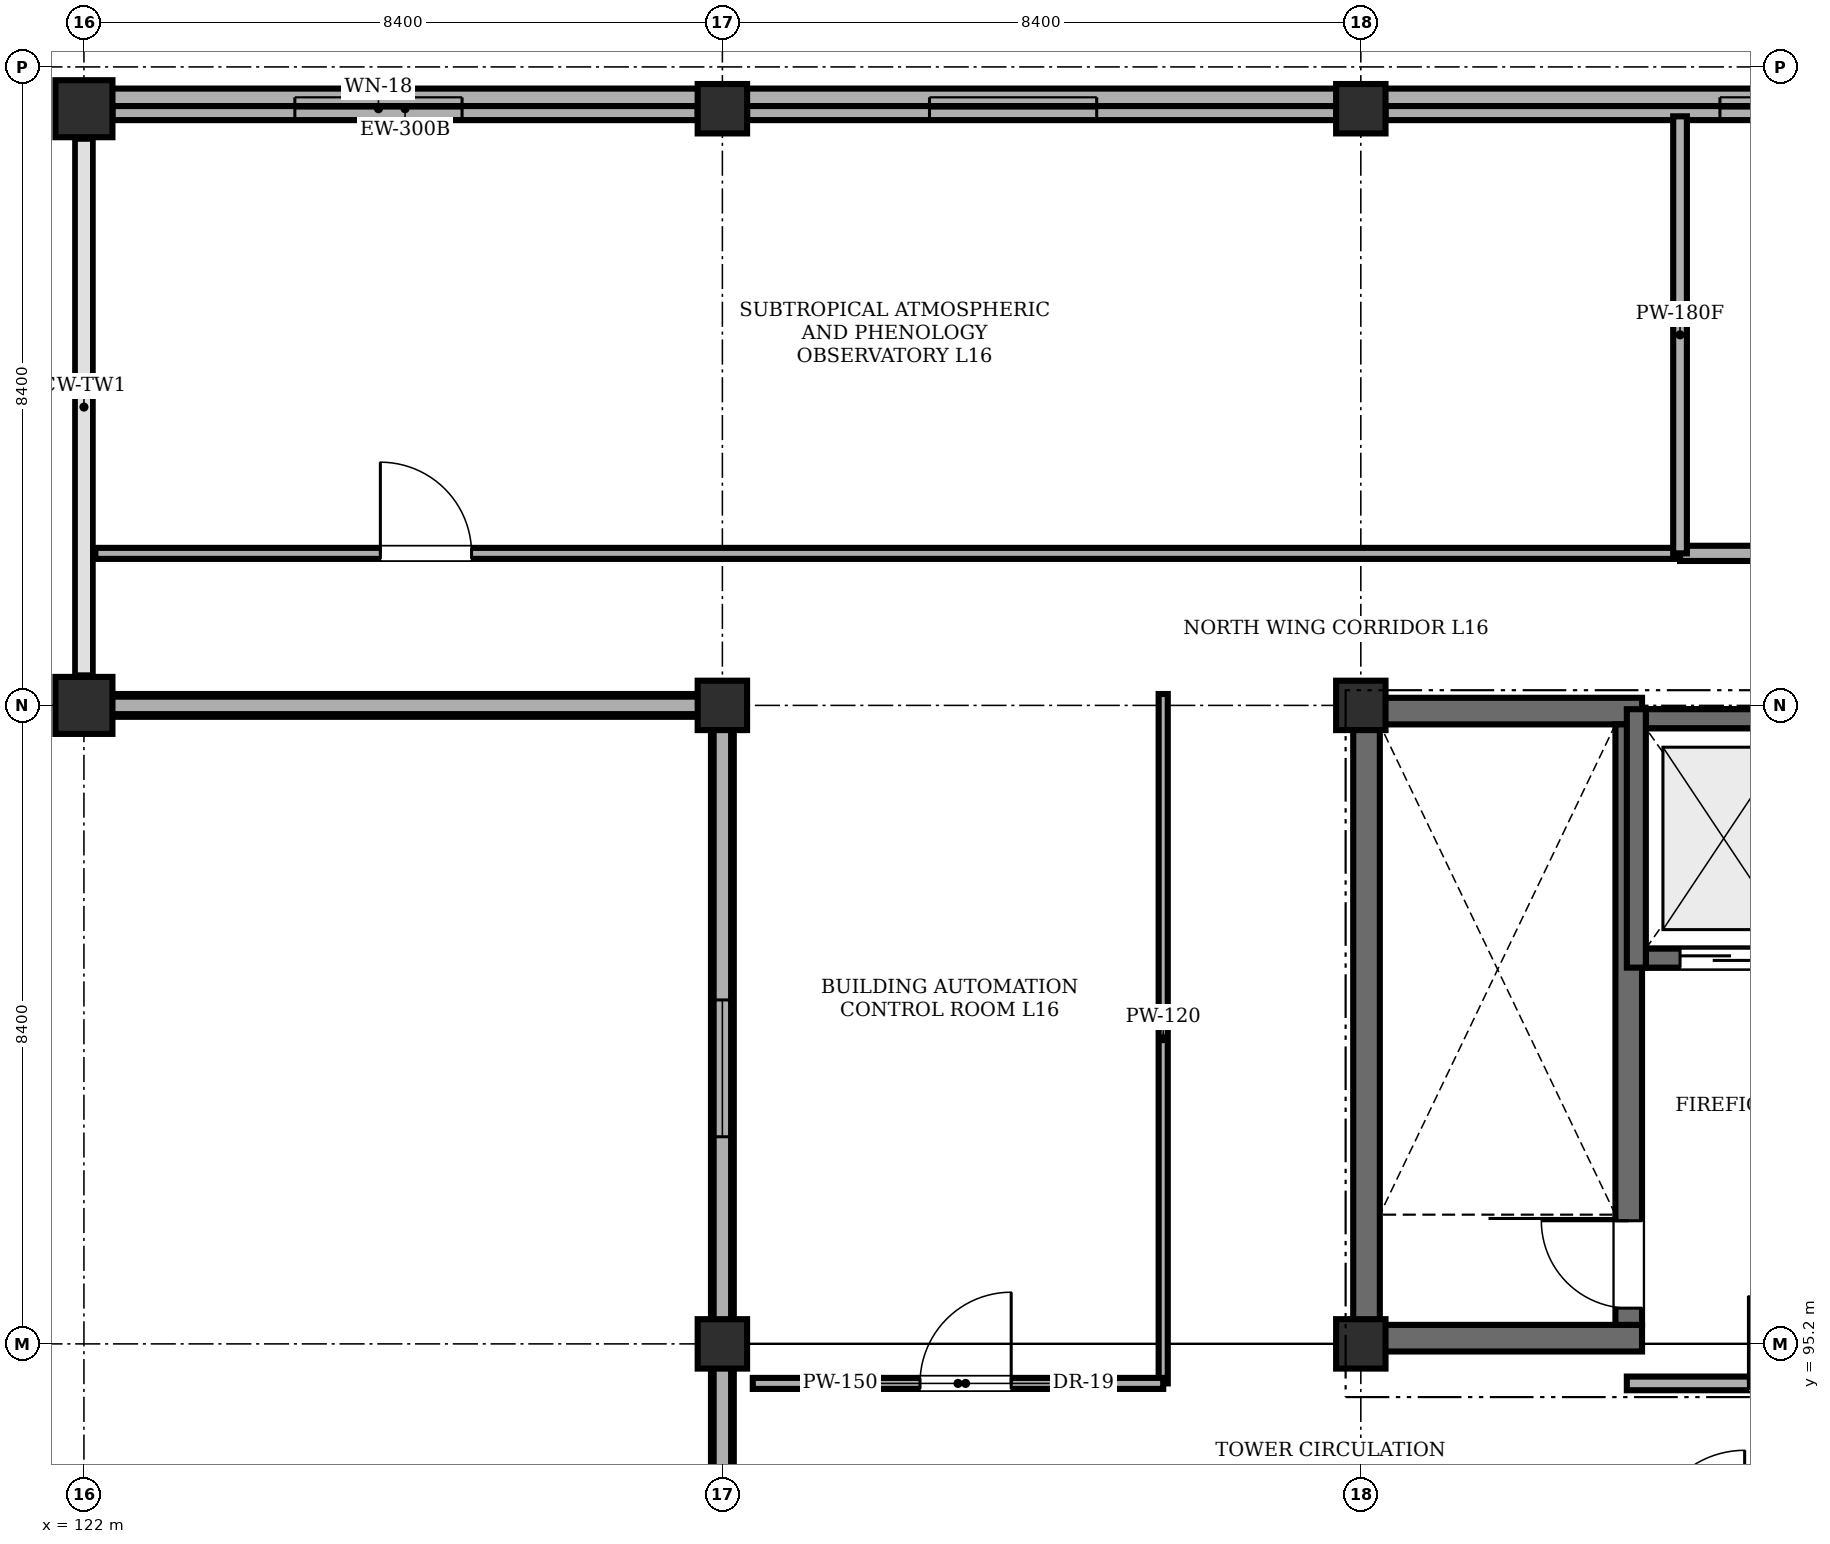
"""IFC4 building model, lengths in metres.
Left out: names, types, materials, properties, quantities, classifications, styles, units other than length and angle.
Written with IfcOpenShell. Run it as: python <this file> out.ifc"""

import sys

from ifc_helpers import new_model, si_unit, direction, frame, frame_2d, origin, origin_2d, place, context, subcontext, project, spatial, rectangle, extrude, element, fill, save


model = new_model("IFC4")
c1 = context("Model", 3, precision=1e-05, world=origin(), true_north=direction((0.0, 1.0)))
c2 = subcontext(c1, "Body", "Model", "MODEL_VIEW")
j1 = project(units=[si_unit("LENGTHUNIT", "METRE"), si_unit("PLANEANGLEUNIT", "RADIAN")], contexts=[c1])
p1 = place(None, origin())
s1 = spatial("IfcSite", under=j1, at=p1, CompositionType="ELEMENT")
p2 = place(p1, origin())
s2 = spatial("IfcBuilding", under=s1, at=p2, CompositionType="ELEMENT")
p3 = place(p2, frame((0.0, 0.0, 65.7)))
s3 = spatial("IfcBuildingStorey", under=s2, at=p3, CompositionType="ELEMENT", Elevation=65.7)
for number, where, z_axis, x_axis in (
    (1, (122.0, 103.6, 0.0), (0.0, 0.0, 1.0), (1.0, 0.0, 0.0)),
    (2, (122.0, 111.45, 0.0), (0.0, 0.0, 1.0), (1.0, 0.0, 0.0)),
):
    element("IfcColumn", number, at=place(p3, frame(where, z_axis=z_axis, x_axis=x_axis)), inside=s3, PredefinedType="COLUMN", context=c2, shape_type="SweptSolid", body=[
        extrude(rectangle(XDim=0.75, YDim=0.75, at=origin_2d()), origin(), (0.0, 0.0, 1.0), 4.3),
    ])
for number, where, z_axis, x_axis in (
    (3, (130.4, 95.2, 0.0), (0.0, 0.0, 1.0), (1.0, 0.0, 0.0)),
    (4, (130.4, 103.6, 0.0), (0.0, 0.0, 1.0), (1.0, 0.0, 0.0)),
    (5, (130.4, 111.45, 0.0), (0.0, 0.0, 1.0), (1.0, 0.0, 0.0)),
    (6, (138.8, 95.2, 0.0), (0.0, 0.0, 1.0), (1.0, 0.0, 0.0)),
    (7, (138.8, 103.6, 0.0), (0.0, 0.0, 1.0), (1.0, 0.0, 0.0)),
    (8, (138.8, 111.45, 0.0), (0.0, 0.0, 1.0), (1.0, 0.0, 0.0)),
):
    element("IfcColumn", number, at=place(p3, frame(where, z_axis=z_axis, x_axis=x_axis)), inside=s3, PredefinedType="COLUMN", context=c2, shape_type="SweptSolid", body=[
        extrude(rectangle(XDim=0.65, YDim=0.65, at=origin_2d()), origin(), (0.0, 0.0, 1.0), 4.3),
    ])
for number, where, z_axis, x_axis in (
    (9, (138.7, 95.275, 0.0), (0.0, 0.0, 1.0), (1.0, 0.0, 0.0)),
    (10, (138.7, 103.525, 0.0), (0.0, 0.0, 1.0), (1.0, 0.0, 0.0)),
):
    element("IfcWall", number, at=place(p3, frame(where, z_axis=z_axis, x_axis=x_axis)), inside=s3, PredefinedType="SHEAR", context=c2, shape_type="SweptSolid", body=[
        extrude(rectangle(XDim=3.8, YDim=0.35, at=frame_2d((1.9, 0.0))), origin(), (0.0, 0.0, 1.0), 4.3),
    ])
p4 = place(p3, frame((138.875, 95.45, 0.0), z_axis=(0.0, 0.0, 1.0), x_axis=(0.0, 1.0, 0.0)))
e11 = element("IfcWall", 11, at=p4, inside=s3, PredefinedType="SHEAR", context=c2, shape_type="SweptSolid", body=[
    extrude(rectangle(XDim=7.9, YDim=0.35, at=frame_2d((3.95, 0.0))), origin(), (0.0, 0.0, 1.0), 4.3),
])
p5 = place(p3, frame((142.325, 95.45, 0.0), z_axis=(0.0, 0.0, 1.0), x_axis=(0.0, 1.0, 0.0)))
e12 = element("IfcWall", 12, at=p5, inside=s3, PredefinedType="SHEAR", context=c2, shape_type="SweptSolid", body=[
    extrude(rectangle(XDim=7.9, YDim=0.35, at=frame_2d((3.95, 0.0))), origin(), (0.0, 0.0, 1.0), 4.3),
])
p6 = place(p5, frame((0.22, 0.0, 0.0)))
e13 = element("IfcOpeningElement", 13, at=p6, cuts=e12, PredefinedType="OPENING", context=c2, shape_type="SweptSolid", body=[
    extrude(rectangle(XDim=1.15, YDim=2.15, at=frame_2d((0.575, 1.075))), frame((0.0, 0.185, 0.0), z_axis=(0.0, -1.0, 0.0), x_axis=(1.0, 0.0, 0.0)), (0.0, 0.0, 1.0), 0.37),
])
p7 = place(p3, frame((142.5, 100.275, 0.0), z_axis=(0.0, 0.0, 1.0), x_axis=(1.0, 0.0, 0.0)))
e14 = element("IfcWall", 14, at=p7, inside=s3, PredefinedType="SHEAR", context=c2, shape_type="SweptSolid", body=[
    extrude(rectangle(XDim=2.1, YDim=0.25, at=frame_2d((1.05, 0.0))), origin(), (0.0, 0.0, 1.0), 4.3),
])
p8 = place(p7, frame((0.5, 0.0, 0.0)))
e15 = element("IfcOpeningElement", 15, at=p8, cuts=e14, PredefinedType="OPENING", context=c2, shape_type="SweptSolid", body=[
    extrude(rectangle(XDim=1.1, YDim=2.15, at=frame_2d((0.55, 1.075))), frame((0.0, 0.135, 0.0), z_axis=(0.0, -1.0, 0.0), x_axis=(1.0, 0.0, 0.0)), (0.0, 0.0, 1.0), 0.27),
])
p9 = place(p3, frame((142.5, 103.425, 0.0), z_axis=(0.0, 0.0, 1.0), x_axis=(1.0, 0.0, 0.0)))
e16 = element("IfcWall", 16, at=p9, inside=s3, PredefinedType="SHEAR", context=c2, shape_type="SweptSolid", body=[
    extrude(rectangle(XDim=2.1, YDim=0.25, at=frame_2d((1.05, 0.0))), origin(), (0.0, 0.0, 1.0), 4.3),
])
for number, where, z_axis, x_axis in (
    (17, (142.55, 100.275, 4.5), (0.0, 0.0, 1.0), (1.0, 0.0, 0.0)),
    (18, (142.55, 103.425, 4.5), (0.0, 0.0, 1.0), (1.0, 0.0, 0.0)),
):
    element("IfcWall", number, at=place(p3, frame(where, z_axis=z_axis, x_axis=x_axis)), inside=s3, PredefinedType="SHEAR", context=c2, shape_type="SweptSolid", body=[
        extrude(rectangle(XDim=2.05, YDim=0.25, at=frame_2d((1.025, 0.0))), origin(), (0.0, 0.0, 1.0), 1.55),
    ])
p10 = place(p3, frame((142.425, 100.15, 4.5), z_axis=(0.0, 0.0, 1.0), x_axis=(0.0, 1.0, 0.0)))
e19 = element("IfcWall", 19, at=p10, inside=s3, PredefinedType="SHEAR", context=c2, shape_type="SweptSolid", body=[
    extrude(rectangle(XDim=3.4, YDim=0.25, at=frame_2d((1.7, 0.0))), origin(), (0.0, 0.0, 1.0), 1.55),
])
p11 = place(p3, frame((122.375, 111.45, 0.0), z_axis=(0.0, 0.0, 1.0), x_axis=(1.0, 0.0, 0.0)))
e20 = element("IfcWall", 20, at=p11, inside=s3, PredefinedType="STANDARD", context=c2, shape_type="SweptSolid", body=[
    extrude(rectangle(XDim=7.7, YDim=0.3, at=frame_2d((3.85, 0.0))), origin(), (0.0, 0.0, 1.0), 3.7),
])
p12 = place(p11, frame((2.4, 0.0, 1.3)))
e21 = element("IfcOpeningElement", 21, at=p12, cuts=e20, PredefinedType="OPENING", context=c2, shape_type="SweptSolid", body=[
    extrude(rectangle(XDim=2.2, YDim=1.2, at=frame_2d((1.1, 0.6))), frame((0.0, 0.16, 0.0), z_axis=(0.0, -1.0, 0.0), x_axis=(1.0, 0.0, 0.0)), (0.0, 0.0, 1.0), 0.32),
])
p13 = place(p3, frame((130.725, 111.45, 0.0), z_axis=(0.0, 0.0, 1.0), x_axis=(1.0, 0.0, 0.0)))
e22 = element("IfcWall", 22, at=p13, inside=s3, PredefinedType="STANDARD", context=c2, shape_type="SweptSolid", body=[
    extrude(rectangle(XDim=7.75, YDim=0.3, at=frame_2d((3.875, 0.0))), origin(), (0.0, 0.0, 1.0), 3.7),
])
p14 = place(p13, frame((2.4, 0.0, 1.3)))
e23 = element("IfcOpeningElement", 23, at=p14, cuts=e22, PredefinedType="OPENING", context=c2, shape_type="SweptSolid", body=[
    extrude(rectangle(XDim=2.2, YDim=1.2, at=frame_2d((1.1, 0.6))), frame((0.0, 0.16, 0.0), z_axis=(0.0, -1.0, 0.0), x_axis=(1.0, 0.0, 0.0)), (0.0, 0.0, 1.0), 0.32),
])
p15 = place(p3, frame((139.125, 111.45, 0.0), z_axis=(0.0, 0.0, 1.0), x_axis=(1.0, 0.0, 0.0)))
e24 = element("IfcWall", 24, at=p15, inside=s3, PredefinedType="STANDARD", context=c2, shape_type="SweptSolid", body=[
    extrude(rectangle(XDim=7.75, YDim=0.3, at=frame_2d((3.875, 0.0))), origin(), (0.0, 0.0, 1.0), 3.7),
])
p16 = place(p15, frame((4.4, 0.0, 1.3)))
e25 = element("IfcOpeningElement", 25, at=p16, cuts=e24, PredefinedType="OPENING", context=c2, shape_type="SweptSolid", body=[
    extrude(rectangle(XDim=2.2, YDim=1.2, at=frame_2d((1.1, 0.6))), frame((0.0, 0.16, 0.0), z_axis=(0.0, -1.0, 0.0), x_axis=(1.0, 0.0, 0.0)), (0.0, 0.0, 1.0), 0.32),
])
p17 = place(p3, frame((130.4, 92.15, 0.0), z_axis=(0.0, 0.0, 1.0), x_axis=(0.0, 1.0, 0.0)))
e26 = element("IfcWall", 26, at=p17, inside=s3, PredefinedType="STANDARD", context=c2, shape_type="SweptSolid", body=[
    extrude(rectangle(XDim=2.725, YDim=0.3, at=frame_2d((1.363, 0.0))), origin(), (0.0, 0.0, 1.0), 4.3),
])
p18 = place(p3, frame((130.4, 95.525, 0.0), z_axis=(0.0, 0.0, 1.0), x_axis=(0.0, 1.0, 0.0)))
e27 = element("IfcWall", 27, at=p18, inside=s3, PredefinedType="STANDARD", context=c2, shape_type="SweptSolid", body=[
    extrude(rectangle(XDim=7.75, YDim=0.3, at=frame_2d((3.875, 0.0))), origin(), (0.0, 0.0, 1.0), 3.7),
])
p19 = place(p18, frame((2.4, 0.0, 1.0)))
e28 = element("IfcOpeningElement", 28, at=p19, cuts=e27, PredefinedType="OPENING", context=c2, shape_type="SweptSolid", body=[
    extrude(rectangle(XDim=1.8, YDim=1.8, at=frame_2d((0.9, 0.9))), frame((0.0, 0.16, 0.0), z_axis=(0.0, -1.0, 0.0), x_axis=(1.0, 0.0, 0.0)), (0.0, 0.0, 1.0), 0.32),
])
p20 = place(p3, frame((130.075, 103.6, 0.0), z_axis=(0.0, 0.0, 1.0), x_axis=(-1.0, 0.0, 0.0)))
e29 = element("IfcWall", 29, at=p20, inside=s3, PredefinedType="STANDARD", context=c2, shape_type="SweptSolid", body=[
    extrude(rectangle(XDim=7.7, YDim=0.3, at=frame_2d((3.85, 0.0))), origin(), (0.0, 0.0, 1.0), 3.7),
])
p21 = place(p3, frame((163.715, 111.6, 4.5), z_axis=(0.0, 0.0, 1.0), x_axis=(-1.0, 0.0, 0.0)))
e30 = element("IfcWall", 30, at=p21, inside=s3, PredefinedType="PARAPET", context=c2, shape_type="SweptSolid", body=[
    extrude(rectangle(XDim=41.83, YDim=0.23, at=frame_2d((20.915, 0.0))), origin(), (0.0, 0.0, 1.0), 1.35),
])
p22 = place(p3, frame((122.0, 111.485, 4.5), z_axis=(0.0, 0.0, 1.0), x_axis=(0.0, -1.0, 0.0)))
e31 = element("IfcWall", 31, at=p22, inside=s3, PredefinedType="PARAPET", context=c2, shape_type="SweptSolid", body=[
    extrude(rectangle(XDim=7.77, YDim=0.23, at=frame_2d((3.885, 0.0))), origin(), (0.0, 0.0, 1.0), 1.35),
])
p23 = place(p3, frame((121.885, 103.6, 4.5), z_axis=(0.0, 0.0, 1.0), x_axis=(1.0, 0.0, 0.0)))
e32 = element("IfcWall", 32, at=p23, inside=s3, PredefinedType="PARAPET", context=c2, shape_type="SweptSolid", body=[
    extrude(rectangle(XDim=8.63, YDim=0.23, at=frame_2d((4.315, 0.0))), origin(), (0.0, 0.0, 1.0), 1.35),
])
p24 = place(p3, frame((130.4, 103.485, 4.5), z_axis=(0.0, 0.0, 1.0), x_axis=(0.0, -1.0, 0.0)))
e33 = element("IfcWall", 33, at=p24, inside=s3, PredefinedType="PARAPET", context=c2, shape_type="SweptSolid", body=[
    extrude(rectangle(XDim=11.37, YDim=0.23, at=frame_2d((5.685, 0.0))), origin(), (0.0, 0.0, 1.0), 1.35),
])
p25 = place(p3, frame((142.3, 94.68, 0.0), z_axis=(0.0, 0.0, 1.0), x_axis=(1.0, 0.0, 0.0)))
e34 = element("IfcWall", 34, at=p25, inside=s3, PredefinedType="STANDARD", context=c2, shape_type="SweptSolid", body=[
    extrude(rectangle(XDim=4.8, YDim=0.18, at=frame_2d((2.4, 0.0))), origin(), (0.0, 0.0, 1.0), 4.3),
])
p26 = place(p25, frame((1.6, 0.0, 0.0)))
e35 = element("IfcOpeningElement", 35, at=p26, cuts=e34, PredefinedType="OPENING", context=c2, shape_type="SweptSolid", body=[
    extrude(rectangle(XDim=1.15, YDim=2.15, at=frame_2d((0.575, 1.075))), frame((0.0, 0.1, 0.0), z_axis=(0.0, -1.0, 0.0), x_axis=(1.0, 0.0, 0.0)), (0.0, 0.0, 1.0), 0.2),
])
p27 = place(p3, frame((136.2, 94.68, 0.0), z_axis=(0.0, 0.0, 1.0), x_axis=(0.0, 1.0, 0.0)))
e36 = element("IfcWall", 36, at=p27, inside=s3, PredefinedType="PARTITIONING", context=c2, shape_type="SweptSolid", body=[
    extrude(rectangle(XDim=9.07, YDim=0.12, at=frame_2d((4.535, 0.0))), origin(), (0.0, 0.0, 1.0), 4.3),
])
p28 = place(p3, frame((130.8, 94.68, 0.0), z_axis=(0.0, 0.0, 1.0), x_axis=(1.0, 0.0, 0.0)))
e37 = element("IfcWall", 37, at=p28, inside=s3, PredefinedType="PARTITIONING", context=c2, shape_type="SweptSolid", body=[
    extrude(rectangle(XDim=5.4, YDim=0.145, at=frame_2d((2.7, 0.0))), origin(), (0.0, 0.0, 1.0), 4.3),
])
p29 = place(p28, frame((2.2, 0.0, 0.0)))
e38 = element("IfcOpeningElement", 38, at=p29, cuts=e37, PredefinedType="OPENING", context=c2, shape_type="SweptSolid", body=[
    extrude(rectangle(XDim=1.2, YDim=2.2, at=frame_2d((0.6, 1.1))), frame((0.0, 0.083, 0.0), z_axis=(0.0, -1.0, 0.0), x_axis=(1.0, 0.0, 0.0)), (0.0, 0.0, 1.0), 0.165),
])
p30 = place(p3, frame((122.15, 105.6, 0.0), z_axis=(0.0, 0.0, 1.0), x_axis=(1.0, 0.0, 0.0)))
e39 = element("IfcWall", 39, at=p30, inside=s3, PredefinedType="PARTITIONING", context=c2, shape_type="SweptSolid", body=[
    extrude(rectangle(XDim=20.85, YDim=0.145, at=frame_2d((10.425, 0.0))), origin(), (0.0, 0.0, 1.0), 4.3),
])
p31 = place(p30, frame((3.75, 0.0, 0.0)))
e40 = element("IfcOpeningElement", 40, at=p31, cuts=e39, PredefinedType="OPENING", context=c2, shape_type="SweptSolid", body=[
    extrude(rectangle(XDim=1.2, YDim=2.2, at=frame_2d((0.6, 1.1))), frame((0.0, 0.083, 0.0), z_axis=(0.0, -1.0, 0.0), x_axis=(1.0, 0.0, 0.0)), (0.0, 0.0, 1.0), 0.165),
])
p32 = place(p3, frame((143.0, 105.6, 0.0), z_axis=(0.0, 0.0, 1.0), x_axis=(1.0, 0.0, 0.0)))
e41 = element("IfcWall", 41, at=p32, inside=s3, PredefinedType="SOLIDWALL", context=c2, shape_type="SweptSolid", body=[
    extrude(rectangle(XDim=20.35, YDim=0.2, at=frame_2d((10.175, 0.0))), origin(), (0.0, 0.0, 1.0), 4.3),
])
p33 = place(p32, frame((6.8, 0.0, 0.0)))
e42 = element("IfcOpeningElement", 42, at=p33, cuts=e41, PredefinedType="OPENING", context=c2, shape_type="SweptSolid", body=[
    extrude(rectangle(XDim=1.25, YDim=2.2, at=frame_2d((0.625, 1.1))), frame((0.0, 0.11, 0.0), z_axis=(0.0, -1.0, 0.0), x_axis=(1.0, 0.0, 0.0)), (0.0, 0.0, 1.0), 0.22),
])
p34 = place(p3, frame((143.0, 105.6, 0.0), z_axis=(0.0, 0.0, 1.0), x_axis=(0.0, 1.0, 0.0)))
e43 = element("IfcWall", 43, at=p34, inside=s3, PredefinedType="STANDARD", context=c2, shape_type="SweptSolid", body=[
    extrude(rectangle(XDim=5.75, YDim=0.18, at=frame_2d((2.875, 0.0))), origin(), (0.0, 0.0, 1.0), 3.85),
])
p35 = place(p12, origin())
e44 = element("IfcWindow", 44, at=p35, inside=s3, PartitioningType="DOUBLE_PANEL_HORIZONTAL", PredefinedType="WINDOW", context=c2, shape_type="SweptSolid", body=[
    extrude(rectangle(XDim=2.2, YDim=1.2, at=frame_2d((1.1, 0.6))), frame((0.0, 0.03, 0.0), z_axis=(0.0, -1.0, 0.0), x_axis=(1.0, 0.0, 0.0)), (0.0, 0.0, 1.0), 0.06),
])
fill(e21, e44)
p36 = place(p14, origin())
e45 = element("IfcWindow", 45, at=p36, inside=s3, PartitioningType="DOUBLE_PANEL_HORIZONTAL", PredefinedType="WINDOW", context=c2, shape_type="SweptSolid", body=[
    extrude(rectangle(XDim=2.2, YDim=1.2, at=frame_2d((1.1, 0.6))), frame((0.0, 0.03, 0.0), z_axis=(0.0, -1.0, 0.0), x_axis=(1.0, 0.0, 0.0)), (0.0, 0.0, 1.0), 0.06),
])
fill(e23, e45)
p37 = place(p16, origin())
e46 = element("IfcWindow", 46, at=p37, inside=s3, PartitioningType="DOUBLE_PANEL_HORIZONTAL", PredefinedType="WINDOW", context=c2, shape_type="SweptSolid", body=[
    extrude(rectangle(XDim=2.2, YDim=1.2, at=frame_2d((1.1, 0.6))), frame((0.0, 0.03, 0.0), z_axis=(0.0, -1.0, 0.0), x_axis=(1.0, 0.0, 0.0)), (0.0, 0.0, 1.0), 0.06),
])
fill(e25, e46)
p38 = place(p19, origin())
e47 = element("IfcWindow", 47, at=p38, inside=s3, PartitioningType="DOUBLE_PANEL_VERTICAL", PredefinedType="WINDOW", context=c2, shape_type="SweptSolid", body=[
    extrude(rectangle(XDim=1.8, YDim=1.8, at=frame_2d((0.9, 0.9))), frame((0.0, 0.03, 0.0), z_axis=(0.0, -1.0, 0.0), x_axis=(1.0, 0.0, 0.0)), (0.0, 0.0, 1.0), 0.06),
])
fill(e28, e47)
p39 = place(p26, origin())
e48 = element("IfcDoor", 48, at=p39, inside=s3, OperationType="SINGLE_SWING_LEFT", PredefinedType="DOOR", context=c2, shape_type="SweptSolid", body=[
    extrude(rectangle(XDim=1.15, YDim=2.15, at=frame_2d((0.575, 1.075))), frame((0.0, 0.025, 0.0), z_axis=(0.0, -1.0, 0.0), x_axis=(1.0, 0.0, 0.0)), (0.0, 0.0, 1.0), 0.05),
])
fill(e35, e48)
p40 = place(p29, origin())
e49 = element("IfcDoor", 49, at=p40, inside=s3, OperationType="SINGLE_SWING_RIGHT", PredefinedType="DOOR", context=c2, shape_type="SweptSolid", body=[
    extrude(rectangle(XDim=1.2, YDim=2.2, at=frame_2d((0.6, 1.1))), frame((0.0, 0.025, 0.0), z_axis=(0.0, -1.0, 0.0), x_axis=(1.0, 0.0, 0.0)), (0.0, 0.0, 1.0), 0.05),
])
fill(e38, e49)
p41 = place(p31, origin())
e50 = element("IfcDoor", 50, at=p41, inside=s3, OperationType="SINGLE_SWING_LEFT", PredefinedType="DOOR", context=c2, shape_type="SweptSolid", body=[
    extrude(rectangle(XDim=1.2, YDim=2.2, at=frame_2d((0.6, 1.1))), frame((0.0, 0.025, 0.0), z_axis=(0.0, -1.0, 0.0), x_axis=(1.0, 0.0, 0.0)), (0.0, 0.0, 1.0), 0.05),
])
fill(e40, e50)
p42 = place(p6, origin())
e51 = element("IfcDoor", 51, at=p42, inside=s3, OperationType="SINGLE_SWING_RIGHT", PredefinedType="DOOR", context=c2, shape_type="SweptSolid", body=[
    extrude(rectangle(XDim=1.15, YDim=2.15, at=frame_2d((0.575, 1.075))), frame((0.0, 0.025, 0.0), z_axis=(0.0, -1.0, 0.0), x_axis=(1.0, 0.0, 0.0)), (0.0, 0.0, 1.0), 0.05),
])
fill(e13, e51)
p43 = place(p8, origin())
e52 = element("IfcDoor", 52, at=p43, inside=s3, OperationType="SLIDING_TO_LEFT", PredefinedType="DOOR", context=c2, shape_type="SweptSolid", body=[
    extrude(rectangle(XDim=1.1, YDim=2.15, at=frame_2d((0.55, 1.075))), frame((0.0, 0.025, 0.0), z_axis=(0.0, -1.0, 0.0), x_axis=(1.0, 0.0, 0.0)), (0.0, 0.0, 1.0), 0.05),
])
fill(e15, e52)
save(model, sys.argv[1])
